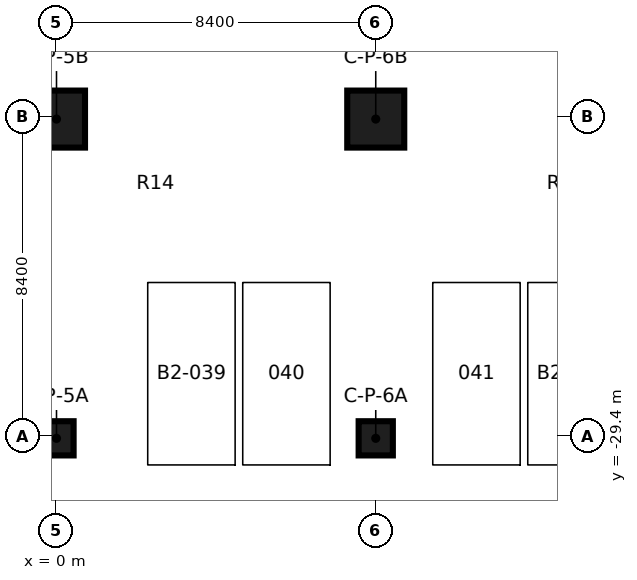
"""IFC4 building model, lengths in metres.
Left out: names, types, materials, properties, quantities, classifications, styles, units other than length and angle.
Written with IfcOpenShell. Run it as: python <this file> out.ifc"""

import sys

from ifc_helpers import new_model, si_unit, direction, frame, origin, origin_2d, place, context, subcontext, project, spatial, rectangle, extrude, element, save


model = new_model("IFC4")
c1 = context("Model", 3, precision=1e-05, world=origin(), true_north=direction((0.0, 1.0)))
c2 = subcontext(c1, "Body", "Model", "MODEL_VIEW")
j1 = project(units=[si_unit("LENGTHUNIT", "METRE"), si_unit("PLANEANGLEUNIT", "RADIAN")], contexts=[c1])
p1 = place(None, origin())
s1 = spatial("IfcSite", under=j1, at=p1, CompositionType="ELEMENT")
p2 = place(p1, origin())
s2 = spatial("IfcBuilding", under=s1, at=p2, CompositionType="ELEMENT")
p3 = place(p2, frame((0.0, 0.0, -9.0)))
s3 = spatial("IfcBuildingStorey", under=s2, at=p3, CompositionType="ELEMENT", Elevation=-9.0)
p4 = place(p3, frame((0.0, -29.4, 0.0), z_axis=(0.0, 0.0, 1.0), x_axis=(1.0, 0.0, 0.0)))
e1 = element("IfcColumn", 1, at=p4, inside=s3, PredefinedType="COLUMN", context=c2, shape_type="SweptSolid", body=[
    extrude(rectangle(XDim=0.9, YDim=0.9, at=origin_2d()), origin(), (0.0, 0.0, 1.0), 3.7),
])
p5 = place(p3, frame((0.0, -21.0, 0.0), z_axis=(0.0, 0.0, 1.0), x_axis=(1.0, 0.0, 0.0)))
e2 = element("IfcColumn", 2, at=p5, inside=s3, PredefinedType="COLUMN", context=c2, shape_type="SweptSolid", body=[
    extrude(rectangle(XDim=1.5, YDim=1.5, at=origin_2d()), origin(), (0.0, 0.0, 1.0), 3.7),
])
p6 = place(p3, frame((8.4, -29.4, 0.0), z_axis=(0.0, 0.0, 1.0), x_axis=(1.0, 0.0, 0.0)))
e3 = element("IfcColumn", 3, at=p6, inside=s3, PredefinedType="COLUMN", context=c2, shape_type="SweptSolid", body=[
    extrude(rectangle(XDim=0.9, YDim=0.9, at=origin_2d()), origin(), (0.0, 0.0, 1.0), 3.7),
])
p7 = place(p3, frame((8.4, -21.0, 0.0), z_axis=(0.0, 0.0, 1.0), x_axis=(1.0, 0.0, 0.0)))
e4 = element("IfcColumn", 4, at=p7, inside=s3, PredefinedType="COLUMN", context=c2, shape_type="SweptSolid", body=[
    extrude(rectangle(XDim=1.5, YDim=1.5, at=origin_2d()), origin(), (0.0, 0.0, 1.0), 3.7),
])
save(model, sys.argv[1])
